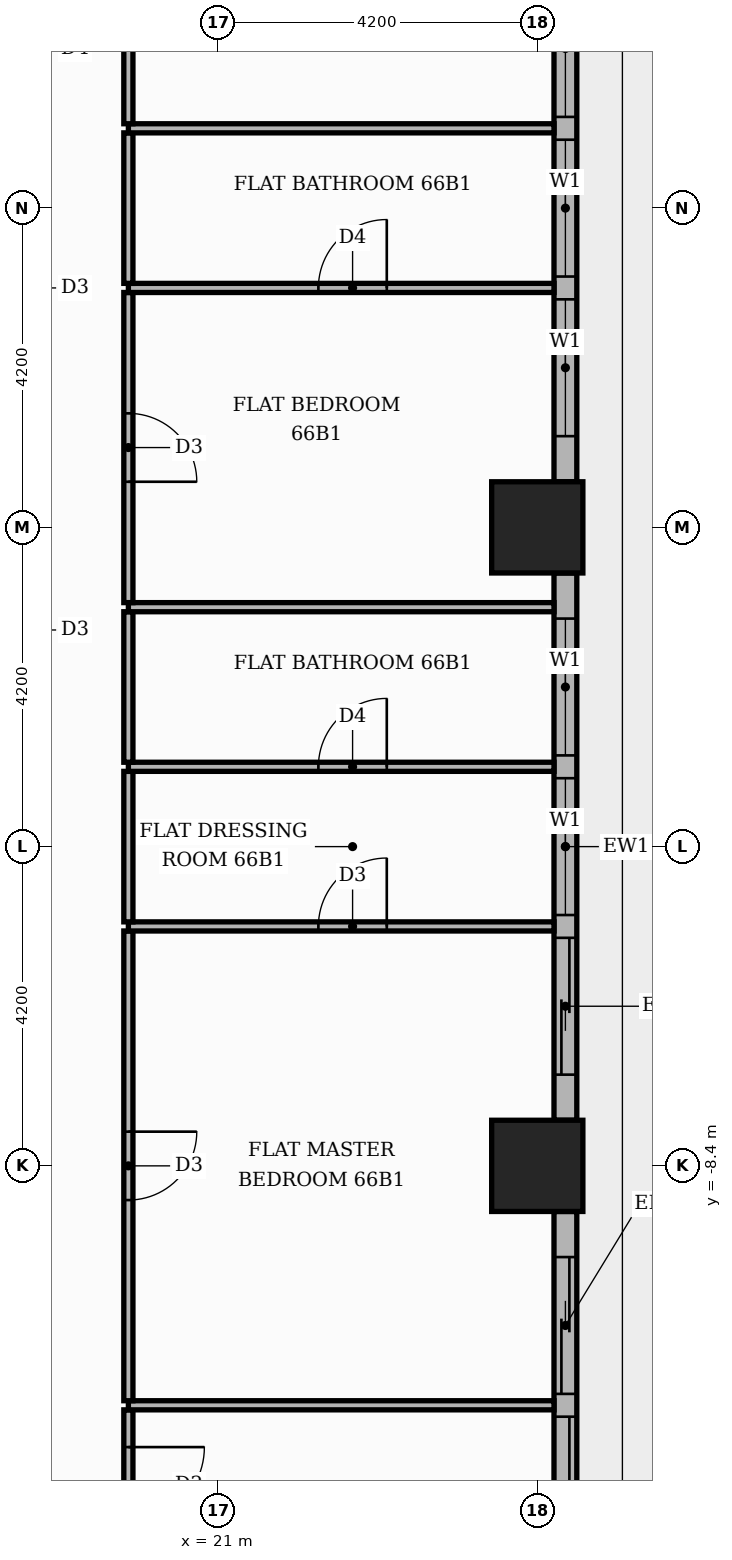
"""IFC4 building model, lengths in metres.
Left out: names, types, materials, properties, quantities, classifications, styles, units other than length and angle.
Written with IfcOpenShell. Run it as: python <this file> out.ifc"""

import sys

from ifc_helpers import new_model, si_unit, direction, frame, frame_2d, origin, origin_2d, place, context, subcontext, project, spatial, rectangle, extrude, element, fill, save


model = new_model("IFC4")
c1 = context("Model", 3, precision=1e-05, world=origin(), true_north=direction((0.0, 1.0)))
c2 = subcontext(c1, "Body", "Model", "MODEL_VIEW")
j1 = project(units=[si_unit("LENGTHUNIT", "METRE"), si_unit("PLANEANGLEUNIT", "RADIAN")], contexts=[c1])
p1 = place(None, origin())
s1 = spatial("IfcSite", under=j1, at=p1, CompositionType="ELEMENT")
p2 = place(p1, origin())
s2 = spatial("IfcBuilding", under=s1, at=p2, CompositionType="ELEMENT")
p3 = place(p2, frame((0.0, 0.0, 275.7)))
s3 = spatial("IfcBuildingStorey", under=s2, at=p3, CompositionType="ELEMENT", Elevation=275.7)
for number, where, z_axis, x_axis in (
    (1, (25.2, 0.0, 0.0), (0.0, 0.0, 1.0), (1.0, 0.0, 0.0)),
    (2, (25.2, -8.4, 0.0), (0.0, 0.0, 1.0), (1.0, 0.0, 0.0)),
):
    element("IfcColumn", number, at=place(p3, frame(where, z_axis=z_axis, x_axis=x_axis)), inside=s3, PredefinedType="COLUMN", context=c2, shape_type="SweptSolid", body=[
        extrude(rectangle(XDim=1.2, YDim=1.2, at=origin_2d()), origin(), (0.0, 0.0, 1.0), 3.9),
    ])
p4 = place(p3, frame((25.57, -16.2, 0.0), z_axis=(0.0, 0.0, 1.0), x_axis=(0.0, 1.0, 0.0)))
e3 = element("IfcWall", 3, at=p4, inside=s3, PredefinedType="STANDARD", context=c2, shape_type="SweptSolid", body=[
    extrude(rectangle(XDim=7.2, YDim=0.3, at=frame_2d((3.6, 0.0))), origin(), (0.0, 0.0, 1.0), 3.48),
])
p5 = place(p4, frame((0.6, 0.0, 0.0)))
e4 = element("IfcOpeningElement", 4, at=p5, cuts=e3, PredefinedType="OPENING", context=c2, shape_type="SweptSolid", body=[
    extrude(rectangle(XDim=3.9, YDim=2.4, at=frame_2d((1.95, 1.2))), frame((0.0, 0.16, 0.0), z_axis=(0.0, -1.0, 0.0), x_axis=(1.0, 0.0, 0.0)), (0.0, 0.0, 1.0), 0.32),
])
p6 = place(p4, frame((4.8, 0.0, 0.0)))
e5 = element("IfcOpeningElement", 5, at=p6, cuts=e3, PredefinedType="OPENING", context=c2, shape_type="SweptSolid", body=[
    extrude(rectangle(XDim=1.8, YDim=2.4, at=frame_2d((0.9, 1.2))), frame((0.0, 0.16, 0.0), z_axis=(0.0, -1.0, 0.0), x_axis=(1.0, 0.0, 0.0)), (0.0, 0.0, 1.0), 0.32),
])
p7 = place(p3, frame((25.57, -7.8, 0.0), z_axis=(0.0, 0.0, 1.0), x_axis=(0.0, 1.0, 0.0)))
e6 = element("IfcWall", 6, at=p7, inside=s3, PredefinedType="STANDARD", context=c2, shape_type="SweptSolid", body=[
    extrude(rectangle(XDim=7.2, YDim=0.3, at=frame_2d((3.6, 0.0))), origin(), (0.0, 0.0, 1.0), 3.48),
])
p8 = place(p7, frame((0.6, 0.0, 0.0)))
e7 = element("IfcOpeningElement", 7, at=p8, cuts=e6, PredefinedType="OPENING", context=c2, shape_type="SweptSolid", body=[
    extrude(rectangle(XDim=1.8, YDim=2.4, at=frame_2d((0.9, 1.2))), frame((0.0, 0.16, 0.0), z_axis=(0.0, -1.0, 0.0), x_axis=(1.0, 0.0, 0.0)), (0.0, 0.0, 1.0), 0.32),
])
p9 = place(p7, frame((2.7, 0.0, 0.9)))
e8 = element("IfcOpeningElement", 8, at=p9, cuts=e6, PredefinedType="OPENING", context=c2, shape_type="SweptSolid", body=[
    extrude(rectangle(XDim=1.8, YDim=2.1, at=frame_2d((0.9, 1.05))), frame((0.0, 0.16, 0.0), z_axis=(0.0, -1.0, 0.0), x_axis=(1.0, 0.0, 0.0)), (0.0, 0.0, 1.0), 0.32),
])
p10 = place(p7, frame((4.8, 0.0, 0.9)))
e9 = element("IfcOpeningElement", 9, at=p10, cuts=e6, PredefinedType="OPENING", context=c2, shape_type="SweptSolid", body=[
    extrude(rectangle(XDim=1.8, YDim=2.1, at=frame_2d((0.9, 1.05))), frame((0.0, 0.16, 0.0), z_axis=(0.0, -1.0, 0.0), x_axis=(1.0, 0.0, 0.0)), (0.0, 0.0, 1.0), 0.32),
])
p11 = place(p3, frame((25.57, 0.6, 0.0), z_axis=(0.0, 0.0, 1.0), x_axis=(0.0, 1.0, 0.0)))
e10 = element("IfcWall", 10, at=p11, inside=s3, PredefinedType="STANDARD", context=c2, shape_type="SweptSolid", body=[
    extrude(rectangle(XDim=7.2, YDim=0.3, at=frame_2d((3.6, 0.0))), origin(), (0.0, 0.0, 1.0), 3.48),
])
p12 = place(p11, frame((0.6, 0.0, 0.9)))
e11 = element("IfcOpeningElement", 11, at=p12, cuts=e10, PredefinedType="OPENING", context=c2, shape_type="SweptSolid", body=[
    extrude(rectangle(XDim=1.8, YDim=2.1, at=frame_2d((0.9, 1.05))), frame((0.0, 0.16, 0.0), z_axis=(0.0, -1.0, 0.0), x_axis=(1.0, 0.0, 0.0)), (0.0, 0.0, 1.0), 0.32),
])
p13 = place(p11, frame((2.7, 0.0, 0.9)))
e12 = element("IfcOpeningElement", 12, at=p13, cuts=e10, PredefinedType="OPENING", context=c2, shape_type="SweptSolid", body=[
    extrude(rectangle(XDim=1.8, YDim=2.1, at=frame_2d((0.9, 1.05))), frame((0.0, 0.16, 0.0), z_axis=(0.0, -1.0, 0.0), x_axis=(1.0, 0.0, 0.0)), (0.0, 0.0, 1.0), 0.32),
])
p14 = place(p11, frame((4.8, 0.0, 0.9)))
e13 = element("IfcOpeningElement", 13, at=p14, cuts=e10, PredefinedType="OPENING", context=c2, shape_type="SweptSolid", body=[
    extrude(rectangle(XDim=1.8, YDim=2.1, at=frame_2d((0.9, 1.05))), frame((0.0, 0.16, 0.0), z_axis=(0.0, -1.0, 0.0), x_axis=(1.0, 0.0, 0.0)), (0.0, 0.0, 1.0), 0.32),
])
p15 = place(p3, frame((19.82, -13.59, 0.0), z_axis=(0.0, 0.0, 1.0), x_axis=(0.0, 1.0, 0.0)))
e14 = element("IfcWall", 14, at=p15, inside=s3, PredefinedType="PARTITIONING", context=c2, shape_type="SweptSolid", body=[
    extrude(rectangle(XDim=1.98, YDim=0.12, at=frame_2d((0.99, 0.0))), origin(), (0.0, 0.0, 1.0), 3.48),
])
p16 = place(p15, frame((0.49, 0.0, 0.0)))
e15 = element("IfcOpeningElement", 15, at=p16, cuts=e14, PredefinedType="OPENING", context=c2, shape_type="SweptSolid", body=[
    extrude(rectangle(XDim=1.0, YDim=2.1, at=frame_2d((0.5, 1.05))), frame((0.0, 0.07, 0.0), z_axis=(0.0, -1.0, 0.0), x_axis=(1.0, 0.0, 0.0)), (0.0, 0.0, 1.0), 0.14),
])
p17 = place(p3, frame((19.82, -11.55, 0.0), z_axis=(0.0, 0.0, 1.0), x_axis=(1.0, 0.0, 0.0)))
e16 = element("IfcWall", 16, at=p17, inside=s3, PredefinedType="PARTITIONING", context=c2, shape_type="SweptSolid", body=[
    extrude(rectangle(XDim=5.6, YDim=0.12, at=frame_2d((2.8, 0.0))), origin(), (0.0, 0.0, 1.0), 3.48),
])
p18 = place(p3, frame((19.82, -11.49, 0.0), z_axis=(0.0, 0.0, 1.0), x_axis=(0.0, 1.0, 0.0)))
e17 = element("IfcWall", 17, at=p18, inside=s3, PredefinedType="PARTITIONING", context=c2, shape_type="SweptSolid", body=[
    extrude(rectangle(XDim=6.18, YDim=0.12, at=frame_2d((3.09, 0.0))), origin(), (0.0, 0.0, 1.0), 3.48),
])
p19 = place(p18, frame((2.64, 0.0, 0.0)))
e18 = element("IfcOpeningElement", 18, at=p19, cuts=e17, PredefinedType="OPENING", context=c2, shape_type="SweptSolid", body=[
    extrude(rectangle(XDim=0.9, YDim=2.1, at=frame_2d((0.45, 1.05))), frame((0.0, 0.07, 0.0), z_axis=(0.0, -1.0, 0.0), x_axis=(1.0, 0.0, 0.0)), (0.0, 0.0, 1.0), 0.14),
])
p20 = place(p3, frame((19.82, -5.25, 0.0), z_axis=(0.0, 0.0, 1.0), x_axis=(1.0, 0.0, 0.0)))
e19 = element("IfcWall", 19, at=p20, inside=s3, PredefinedType="PARTITIONING", context=c2, shape_type="SweptSolid", body=[
    extrude(rectangle(XDim=5.6, YDim=0.12, at=frame_2d((2.8, 0.0))), origin(), (0.0, 0.0, 1.0), 3.48),
])
p21 = place(p20, frame((2.5, 0.0, 0.0)))
e20 = element("IfcOpeningElement", 20, at=p21, cuts=e19, PredefinedType="OPENING", context=c2, shape_type="SweptSolid", body=[
    extrude(rectangle(XDim=0.9, YDim=2.1, at=frame_2d((0.45, 1.05))), frame((0.0, 0.07, 0.0), z_axis=(0.0, -1.0, 0.0), x_axis=(1.0, 0.0, 0.0)), (0.0, 0.0, 1.0), 0.14),
])
p22 = place(p3, frame((19.82, -5.19, 0.0), z_axis=(0.0, 0.0, 1.0), x_axis=(0.0, 1.0, 0.0)))
e21 = element("IfcWall", 21, at=p22, inside=s3, PredefinedType="PARTITIONING", context=c2, shape_type="SweptSolid", body=[
    extrude(rectangle(XDim=1.98, YDim=0.12, at=frame_2d((0.99, 0.0))), origin(), (0.0, 0.0, 1.0), 3.48),
])
p23 = place(p3, frame((19.82, -3.15, 0.0), z_axis=(0.0, 0.0, 1.0), x_axis=(1.0, 0.0, 0.0)))
e22 = element("IfcWall", 22, at=p23, inside=s3, PredefinedType="PARTITIONING", context=c2, shape_type="SweptSolid", body=[
    extrude(rectangle(XDim=5.6, YDim=0.12, at=frame_2d((2.8, 0.0))), origin(), (0.0, 0.0, 1.0), 3.48),
])
p24 = place(p23, frame((2.5, 0.0, 0.0)))
e23 = element("IfcOpeningElement", 23, at=p24, cuts=e22, PredefinedType="OPENING", context=c2, shape_type="SweptSolid", body=[
    extrude(rectangle(XDim=0.9, YDim=2.1, at=frame_2d((0.45, 1.05))), frame((0.0, 0.07, 0.0), z_axis=(0.0, -1.0, 0.0), x_axis=(1.0, 0.0, 0.0)), (0.0, 0.0, 1.0), 0.14),
])
p25 = place(p3, frame((19.82, -3.09, 0.0), z_axis=(0.0, 0.0, 1.0), x_axis=(0.0, 1.0, 0.0)))
e24 = element("IfcWall", 24, at=p25, inside=s3, PredefinedType="PARTITIONING", context=c2, shape_type="SweptSolid", body=[
    extrude(rectangle(XDim=1.98, YDim=0.12, at=frame_2d((0.99, 0.0))), origin(), (0.0, 0.0, 1.0), 3.48),
])
p26 = place(p3, frame((19.82, -1.05, 0.0), z_axis=(0.0, 0.0, 1.0), x_axis=(1.0, 0.0, 0.0)))
e25 = element("IfcWall", 25, at=p26, inside=s3, PredefinedType="PARTITIONING", context=c2, shape_type="SweptSolid", body=[
    extrude(rectangle(XDim=5.6, YDim=0.12, at=frame_2d((2.8, 0.0))), origin(), (0.0, 0.0, 1.0), 3.48),
])
p27 = place(p3, frame((19.82, -0.99, 0.0), z_axis=(0.0, 0.0, 1.0), x_axis=(0.0, 1.0, 0.0)))
e26 = element("IfcWall", 26, at=p27, inside=s3, PredefinedType="PARTITIONING", context=c2, shape_type="SweptSolid", body=[
    extrude(rectangle(XDim=4.08, YDim=0.12, at=frame_2d((2.04, 0.0))), origin(), (0.0, 0.0, 1.0), 3.48),
])
p28 = place(p27, frame((1.59, 0.0, 0.0)))
e27 = element("IfcOpeningElement", 27, at=p28, cuts=e26, PredefinedType="OPENING", context=c2, shape_type="SweptSolid", body=[
    extrude(rectangle(XDim=0.9, YDim=2.1, at=frame_2d((0.45, 1.05))), frame((0.0, 0.07, 0.0), z_axis=(0.0, -1.0, 0.0), x_axis=(1.0, 0.0, 0.0)), (0.0, 0.0, 1.0), 0.14),
])
p29 = place(p3, frame((19.82, 3.15, 0.0), z_axis=(0.0, 0.0, 1.0), x_axis=(1.0, 0.0, 0.0)))
e28 = element("IfcWall", 28, at=p29, inside=s3, PredefinedType="PARTITIONING", context=c2, shape_type="SweptSolid", body=[
    extrude(rectangle(XDim=5.6, YDim=0.12, at=frame_2d((2.8, 0.0))), origin(), (0.0, 0.0, 1.0), 3.48),
])
p30 = place(p29, frame((2.5, 0.0, 0.0)))
e29 = element("IfcOpeningElement", 29, at=p30, cuts=e28, PredefinedType="OPENING", context=c2, shape_type="SweptSolid", body=[
    extrude(rectangle(XDim=0.9, YDim=2.1, at=frame_2d((0.45, 1.05))), frame((0.0, 0.07, 0.0), z_axis=(0.0, -1.0, 0.0), x_axis=(1.0, 0.0, 0.0)), (0.0, 0.0, 1.0), 0.14),
])
p31 = place(p3, frame((19.82, 3.21, 0.0), z_axis=(0.0, 0.0, 1.0), x_axis=(0.0, 1.0, 0.0)))
e30 = element("IfcWall", 30, at=p31, inside=s3, PredefinedType="PARTITIONING", context=c2, shape_type="SweptSolid", body=[
    extrude(rectangle(XDim=1.98, YDim=0.12, at=frame_2d((0.99, 0.0))), origin(), (0.0, 0.0, 1.0), 3.48),
])
p32 = place(p3, frame((19.82, 5.25, 0.0), z_axis=(0.0, 0.0, 1.0), x_axis=(1.0, 0.0, 0.0)))
e31 = element("IfcWall", 31, at=p32, inside=s3, PredefinedType="PARTITIONING", context=c2, shape_type="SweptSolid", body=[
    extrude(rectangle(XDim=5.6, YDim=0.12, at=frame_2d((2.8, 0.0))), origin(), (0.0, 0.0, 1.0), 3.48),
])
p33 = place(p3, frame((19.82, 5.31, 0.0), z_axis=(0.0, 0.0, 1.0), x_axis=(0.0, 1.0, 0.0)))
e32 = element("IfcWall", 32, at=p33, inside=s3, PredefinedType="PARTITIONING", context=c2, shape_type="SweptSolid", body=[
    extrude(rectangle(XDim=6.18, YDim=0.12, at=frame_2d((3.09, 0.0))), origin(), (0.0, 0.0, 1.0), 3.48),
])
p34 = place(p33, frame((2.64, 0.0, 0.0)))
e33 = element("IfcOpeningElement", 33, at=p34, cuts=e32, PredefinedType="OPENING", context=c2, shape_type="SweptSolid", body=[
    extrude(rectangle(XDim=0.9, YDim=2.1, at=frame_2d((0.45, 1.05))), frame((0.0, 0.07, 0.0), z_axis=(0.0, -1.0, 0.0), x_axis=(1.0, 0.0, 0.0)), (0.0, 0.0, 1.0), 0.14),
])
p35 = place(p5, origin())
e34 = element("IfcDoor", 34, at=p35, inside=s3, OperationType="SLIDING_TO_LEFT", PredefinedType="DOOR", context=c2, shape_type="SweptSolid", body=[
    extrude(rectangle(XDim=3.9, YDim=2.4, at=frame_2d((1.95, 1.2))), frame((0.0, 0.025, 0.0), z_axis=(0.0, -1.0, 0.0), x_axis=(1.0, 0.0, 0.0)), (0.0, 0.0, 1.0), 0.05),
])
fill(e4, e34)
p36 = place(p6, origin())
e35 = element("IfcDoor", 35, at=p36, inside=s3, OperationType="SLIDING_TO_RIGHT", PredefinedType="DOOR", context=c2, shape_type="SweptSolid", body=[
    extrude(rectangle(XDim=1.8, YDim=2.4, at=frame_2d((0.9, 1.2))), frame((0.0, 0.025, 0.0), z_axis=(0.0, -1.0, 0.0), x_axis=(1.0, 0.0, 0.0)), (0.0, 0.0, 1.0), 0.05),
])
fill(e5, e35)
p37 = place(p8, origin())
e36 = element("IfcDoor", 36, at=p37, inside=s3, OperationType="SLIDING_TO_LEFT", PredefinedType="DOOR", context=c2, shape_type="SweptSolid", body=[
    extrude(rectangle(XDim=1.8, YDim=2.4, at=frame_2d((0.9, 1.2))), frame((0.0, 0.025, 0.0), z_axis=(0.0, -1.0, 0.0), x_axis=(1.0, 0.0, 0.0)), (0.0, 0.0, 1.0), 0.05),
])
fill(e7, e36)
p38 = place(p9, origin())
e37 = element("IfcWindow", 37, at=p38, inside=s3, PartitioningType="SINGLE_PANEL", PredefinedType="WINDOW", context=c2, shape_type="SweptSolid", body=[
    extrude(rectangle(XDim=1.8, YDim=2.1, at=frame_2d((0.9, 1.05))), frame((0.0, 0.03, 0.0), z_axis=(0.0, -1.0, 0.0), x_axis=(1.0, 0.0, 0.0)), (0.0, 0.0, 1.0), 0.06),
])
fill(e8, e37)
p39 = place(p10, origin())
e38 = element("IfcWindow", 38, at=p39, inside=s3, PartitioningType="SINGLE_PANEL", PredefinedType="WINDOW", context=c2, shape_type="SweptSolid", body=[
    extrude(rectangle(XDim=1.8, YDim=2.1, at=frame_2d((0.9, 1.05))), frame((0.0, 0.03, 0.0), z_axis=(0.0, -1.0, 0.0), x_axis=(1.0, 0.0, 0.0)), (0.0, 0.0, 1.0), 0.06),
])
fill(e9, e38)
p40 = place(p12, origin())
e39 = element("IfcWindow", 39, at=p40, inside=s3, PartitioningType="SINGLE_PANEL", PredefinedType="WINDOW", context=c2, shape_type="SweptSolid", body=[
    extrude(rectangle(XDim=1.8, YDim=2.1, at=frame_2d((0.9, 1.05))), frame((0.0, 0.03, 0.0), z_axis=(0.0, -1.0, 0.0), x_axis=(1.0, 0.0, 0.0)), (0.0, 0.0, 1.0), 0.06),
])
fill(e11, e39)
p41 = place(p13, origin())
e40 = element("IfcWindow", 40, at=p41, inside=s3, PartitioningType="SINGLE_PANEL", PredefinedType="WINDOW", context=c2, shape_type="SweptSolid", body=[
    extrude(rectangle(XDim=1.8, YDim=2.1, at=frame_2d((0.9, 1.05))), frame((0.0, 0.03, 0.0), z_axis=(0.0, -1.0, 0.0), x_axis=(1.0, 0.0, 0.0)), (0.0, 0.0, 1.0), 0.06),
])
fill(e12, e40)
p42 = place(p14, origin())
e41 = element("IfcWindow", 41, at=p42, inside=s3, PartitioningType="SINGLE_PANEL", PredefinedType="WINDOW", context=c2, shape_type="SweptSolid", body=[
    extrude(rectangle(XDim=1.8, YDim=2.1, at=frame_2d((0.9, 1.05))), frame((0.0, 0.03, 0.0), z_axis=(0.0, -1.0, 0.0), x_axis=(1.0, 0.0, 0.0)), (0.0, 0.0, 1.0), 0.06),
])
fill(e13, e41)
p43 = place(p16, frame((1.0, 0.0, 0.0), z_axis=(0.0, 0.0, 1.0), x_axis=(-1.0, 0.0, 0.0)))
e42 = element("IfcDoor", 42, at=p43, inside=s3, OperationType="SINGLE_SWING_RIGHT", PredefinedType="DOOR", context=c2, shape_type="SweptSolid", body=[
    extrude(rectangle(XDim=1.0, YDim=2.1, at=frame_2d((0.5, 1.05))), frame((0.0, 0.025, 0.0), z_axis=(0.0, -1.0, 0.0), x_axis=(1.0, 0.0, 0.0)), (0.0, 0.0, 1.0), 0.05),
])
fill(e15, e42)
p44 = place(p19, frame((0.9, 0.0, 0.0), z_axis=(0.0, 0.0, 1.0), x_axis=(-1.0, 0.0, 0.0)))
e43 = element("IfcDoor", 43, at=p44, inside=s3, OperationType="SINGLE_SWING_RIGHT", PredefinedType="DOOR", context=c2, shape_type="SweptSolid", body=[
    extrude(rectangle(XDim=0.9, YDim=2.1, at=frame_2d((0.45, 1.05))), frame((0.0, 0.025, 0.0), z_axis=(0.0, -1.0, 0.0), x_axis=(1.0, 0.0, 0.0)), (0.0, 0.0, 1.0), 0.05),
])
fill(e18, e43)
p45 = place(p21, origin())
e44 = element("IfcDoor", 44, at=p45, inside=s3, OperationType="SINGLE_SWING_RIGHT", PredefinedType="DOOR", context=c2, shape_type="SweptSolid", body=[
    extrude(rectangle(XDim=0.9, YDim=2.1, at=frame_2d((0.45, 1.05))), frame((0.0, 0.025, 0.0), z_axis=(0.0, -1.0, 0.0), x_axis=(1.0, 0.0, 0.0)), (0.0, 0.0, 1.0), 0.05),
])
fill(e20, e44)
p46 = place(p24, origin())
e45 = element("IfcDoor", 45, at=p46, inside=s3, OperationType="SINGLE_SWING_RIGHT", PredefinedType="DOOR", context=c2, shape_type="SweptSolid", body=[
    extrude(rectangle(XDim=0.9, YDim=2.1, at=frame_2d((0.45, 1.05))), frame((0.0, 0.025, 0.0), z_axis=(0.0, -1.0, 0.0), x_axis=(1.0, 0.0, 0.0)), (0.0, 0.0, 1.0), 0.05),
])
fill(e23, e45)
p47 = place(p28, frame((0.9, 0.0, 0.0), z_axis=(0.0, 0.0, 1.0), x_axis=(-1.0, 0.0, 0.0)))
e46 = element("IfcDoor", 46, at=p47, inside=s3, OperationType="SINGLE_SWING_LEFT", PredefinedType="DOOR", context=c2, shape_type="SweptSolid", body=[
    extrude(rectangle(XDim=0.9, YDim=2.1, at=frame_2d((0.45, 1.05))), frame((0.0, 0.025, 0.0), z_axis=(0.0, -1.0, 0.0), x_axis=(1.0, 0.0, 0.0)), (0.0, 0.0, 1.0), 0.05),
])
fill(e27, e46)
p48 = place(p30, origin())
e47 = element("IfcDoor", 47, at=p48, inside=s3, OperationType="SINGLE_SWING_RIGHT", PredefinedType="DOOR", context=c2, shape_type="SweptSolid", body=[
    extrude(rectangle(XDim=0.9, YDim=2.1, at=frame_2d((0.45, 1.05))), frame((0.0, 0.025, 0.0), z_axis=(0.0, -1.0, 0.0), x_axis=(1.0, 0.0, 0.0)), (0.0, 0.0, 1.0), 0.05),
])
fill(e29, e47)
save(model, sys.argv[1])
